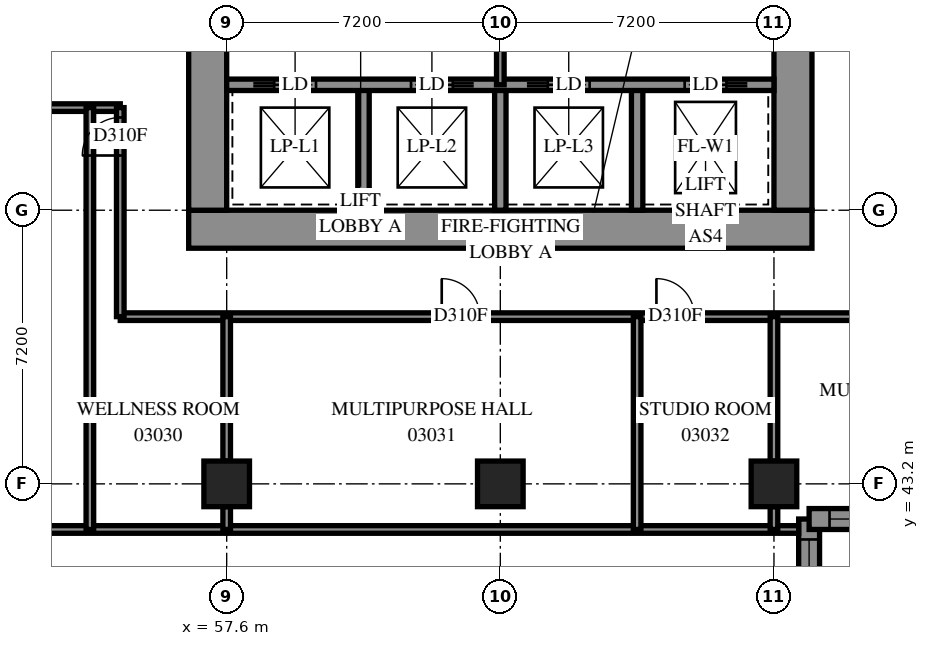
"""IFC4 building model, lengths in metres.
Left out: names, types, materials, properties, quantities, classifications, styles, units other than length and angle.
Written with IfcOpenShell. Run it as: python <this file> out.ifc"""

import sys

from ifc_helpers import new_model, si_unit, direction, frame, frame_2d, origin, origin_2d, place, context, subcontext, project, spatial, polyline, rectangle, outline, extrude, element, fill, save


model = new_model("IFC4")
c1 = context("Model", 3, precision=1e-05, world=origin(), true_north=direction((0.0, 1.0)))
c2 = subcontext(c1, "Body", "Model", "MODEL_VIEW")
j1 = project(units=[si_unit("LENGTHUNIT", "METRE"), si_unit("PLANEANGLEUNIT", "RADIAN")], contexts=[c1])
p1 = place(None, origin())
s1 = spatial("IfcSite", under=j1, at=p1, CompositionType="ELEMENT")
p2 = place(p1, origin())
s2 = spatial("IfcBuilding", under=s1, at=p2, CompositionType="ELEMENT")
p3 = place(p2, frame((0.0, 0.0, 14.4)))
s3 = spatial("IfcBuildingStorey", under=s2, at=p3, CompositionType="ELEMENT", Elevation=14.4)
for number, where, z_axis, x_axis in (
    (1, (57.6, 43.2, 0.0), (0.0, 0.0, 1.0), (1.0, 0.0, 0.0)),
    (2, (64.8, 43.2, 0.0), (0.0, 0.0, 1.0), (1.0, 0.0, 0.0)),
    (3, (72.0, 43.2, 0.0), (0.0, 0.0, 1.0), (1.0, 0.0, 0.0)),
):
    element("IfcColumn", number, at=place(p3, frame(where, z_axis=z_axis, x_axis=x_axis)), inside=s3, PredefinedType="COLUMN", context=c2, shape_type="SweptSolid", body=[
        extrude(rectangle(XDim=1.2, YDim=1.2, at=origin_2d()), origin(), (0.0, 0.0, 1.0), 3.8),
    ])
p4 = place(p3, frame((56.6, 49.9, -0.4), z_axis=(0.0, 0.0, 1.0), x_axis=(1.0, 0.0, 0.0)))
e4 = element("IfcWall", 4, at=p4, inside=s3, PredefinedType="SHEAR", context=c2, shape_type="SweptSolid", body=[
    extrude(rectangle(XDim=16.4, YDim=1.0, at=frame_2d((8.2, 0.0))), origin(), (0.0, 0.0, 1.0), 3.5),
])
p5 = place(p3, frame((57.1, 50.4, -0.4), z_axis=(0.0, 0.0, 1.0), x_axis=(0.0, 1.0, 0.0)))
e5 = element("IfcWall", 5, at=p5, inside=s3, PredefinedType="SHEAR", context=c2, shape_type="SweptSolid", body=[
    extrude(rectangle(XDim=14.4, YDim=1.0, at=frame_2d((7.2, 0.0))), origin(), (0.0, 0.0, 1.0), 3.5),
])
p6 = place(p5, frame((4.55, 0.0, 0.4)))
e6 = element("IfcOpeningElement", 6, at=p6, cuts=e5, PredefinedType="OPENING", context=c2, shape_type="SweptSolid", body=[
    extrude(rectangle(XDim=1.1, YDim=2.1, at=frame_2d((0.55, 1.05))), frame((0.0, 0.51, 0.0), z_axis=(0.0, -1.0, 0.0), x_axis=(1.0, 0.0, 0.0)), (0.0, 0.0, 1.0), 1.02),
])
p7 = place(p5, frame((11.35, 0.0, 0.4)))
e7 = element("IfcOpeningElement", 7, at=p7, cuts=e5, PredefinedType="OPENING", context=c2, shape_type="SweptSolid", body=[
    extrude(rectangle(XDim=1.1, YDim=2.1, at=frame_2d((0.55, 1.05))), frame((0.0, 0.51, 0.0), z_axis=(0.0, -1.0, 0.0), x_axis=(1.0, 0.0, 0.0)), (0.0, 0.0, 1.0), 1.02),
])
p8 = place(p3, frame((72.5, 50.4, -0.4), z_axis=(0.0, 0.0, 1.0), x_axis=(0.0, 1.0, 0.0)))
e8 = element("IfcWall", 8, at=p8, inside=s3, PredefinedType="SHEAR", context=c2, shape_type="SweptSolid", body=[
    extrude(rectangle(XDim=14.4, YDim=1.0, at=frame_2d((7.2, 0.0))), origin(), (0.0, 0.0, 1.0), 3.5),
])
p9 = place(p8, frame((4.55, 0.0, 0.4)))
e9 = element("IfcOpeningElement", 9, at=p9, cuts=e8, PredefinedType="OPENING", context=c2, shape_type="SweptSolid", body=[
    extrude(rectangle(XDim=1.1, YDim=2.1, at=frame_2d((0.55, 1.05))), frame((0.0, 0.51, 0.0), z_axis=(0.0, -1.0, 0.0), x_axis=(1.0, 0.0, 0.0)), (0.0, 0.0, 1.0), 1.02),
])
p10 = place(p8, frame((11.35, 0.0, 0.4)))
e10 = element("IfcOpeningElement", 10, at=p10, cuts=e8, PredefinedType="OPENING", context=c2, shape_type="SweptSolid", body=[
    extrude(rectangle(XDim=1.1, YDim=2.1, at=frame_2d((0.55, 1.05))), frame((0.0, 0.51, 0.0), z_axis=(0.0, -1.0, 0.0), x_axis=(1.0, 0.0, 0.0)), (0.0, 0.0, 1.0), 1.02),
])
for number, where, z_axis, x_axis in (
    (11, (61.2, 50.4, 0.0), (0.0, 0.0, 1.0), (0.0, 1.0, 0.0)),
    (12, (64.8, 50.4, 0.0), (0.0, 0.0, 1.0), (0.0, 1.0, 0.0)),
    (13, (68.4, 50.4, 0.0), (0.0, 0.0, 1.0), (0.0, 1.0, 0.0)),
):
    element("IfcWall", number, at=place(p3, frame(where, z_axis=z_axis, x_axis=x_axis)), inside=s3, PredefinedType="SOLIDWALL", context=c2, shape_type="SweptSolid", body=[
        extrude(rectangle(XDim=3.3, YDim=0.3, at=frame_2d((1.65, 0.0))), origin(), (0.0, 0.0, 1.0), 3.8),
    ])
p11 = place(p3, frame((57.6, 53.7, 0.0), z_axis=(0.0, 0.0, 1.0), x_axis=(1.0, 0.0, 0.0)))
e14 = element("IfcWall", 14, at=p11, inside=s3, PredefinedType="SOLIDWALL", context=c2, shape_type="SweptSolid", body=[
    extrude(rectangle(XDim=14.4, YDim=0.3, at=frame_2d((7.2, 0.0))), origin(), (0.0, 0.0, 1.0), 3.8),
])
p12 = place(p11, frame((1.25, 0.0, 0.0)))
e15 = element("IfcOpeningElement", 15, at=p12, cuts=e14, PredefinedType="OPENING", context=c2, shape_type="SweptSolid", body=[
    extrude(rectangle(XDim=1.1, YDim=2.1, at=frame_2d((0.55, 1.05))), frame((0.0, 0.16, 0.0), z_axis=(0.0, -1.0, 0.0), x_axis=(1.0, 0.0, 0.0)), (0.0, 0.0, 1.0), 0.32),
])
p13 = place(p11, frame((4.85, 0.0, 0.0)))
e16 = element("IfcOpeningElement", 16, at=p13, cuts=e14, PredefinedType="OPENING", context=c2, shape_type="SweptSolid", body=[
    extrude(rectangle(XDim=1.1, YDim=2.1, at=frame_2d((0.55, 1.05))), frame((0.0, 0.16, 0.0), z_axis=(0.0, -1.0, 0.0), x_axis=(1.0, 0.0, 0.0)), (0.0, 0.0, 1.0), 0.32),
])
p14 = place(p11, frame((8.45, 0.0, 0.0)))
e17 = element("IfcOpeningElement", 17, at=p14, cuts=e14, PredefinedType="OPENING", context=c2, shape_type="SweptSolid", body=[
    extrude(rectangle(XDim=1.1, YDim=2.1, at=frame_2d((0.55, 1.05))), frame((0.0, 0.16, 0.0), z_axis=(0.0, -1.0, 0.0), x_axis=(1.0, 0.0, 0.0)), (0.0, 0.0, 1.0), 0.32),
])
p15 = place(p11, frame((12.05, 0.0, 0.0)))
e18 = element("IfcOpeningElement", 18, at=p15, cuts=e14, PredefinedType="OPENING", context=c2, shape_type="SweptSolid", body=[
    extrude(rectangle(XDim=1.1, YDim=2.1, at=frame_2d((0.55, 1.05))), frame((0.0, 0.16, 0.0), z_axis=(0.0, -1.0, 0.0), x_axis=(1.0, 0.0, 0.0)), (0.0, 0.0, 1.0), 0.32),
])
p16 = place(p3, frame((72.925, 27.875, 0.0), z_axis=(0.0, 0.0, 1.0), x_axis=(0.0, 1.0, 0.0)))
e19 = element("IfcWall", 19, at=p16, inside=s3, PredefinedType="SOLIDWALL", context=c2, shape_type="SweptSolid", body=[
    extrude(outline(polyline([(-0.275, -0.275), (14.125, -0.275), (14.675, 0.275), (0.275, 0.275), (-0.275, -0.275)])), origin(), (0.0, 0.0, 1.0), 3.8),
])
p17 = place(p16, frame((1.825, 0.0, 0.7)))
e20 = element("IfcOpeningElement", 20, at=p17, cuts=e19, PredefinedType="OPENING", context=c2, shape_type="SweptSolid", body=[
    extrude(rectangle(XDim=1.8, YDim=2.6, at=frame_2d((0.9, 1.3))), frame((0.0, 0.285, 0.0), z_axis=(0.0, -1.0, 0.0), x_axis=(1.0, 0.0, 0.0)), (0.0, 0.0, 1.0), 0.57),
])
p18 = place(p16, frame((5.425, 0.0, 0.7)))
e21 = element("IfcOpeningElement", 21, at=p18, cuts=e19, PredefinedType="OPENING", context=c2, shape_type="SweptSolid", body=[
    extrude(rectangle(XDim=1.8, YDim=2.6, at=frame_2d((0.9, 1.3))), frame((0.0, 0.285, 0.0), z_axis=(0.0, -1.0, 0.0), x_axis=(1.0, 0.0, 0.0)), (0.0, 0.0, 1.0), 0.57),
])
p19 = place(p16, frame((9.025, 0.0, 0.7)))
e22 = element("IfcOpeningElement", 22, at=p19, cuts=e19, PredefinedType="OPENING", context=c2, shape_type="SweptSolid", body=[
    extrude(rectangle(XDim=1.8, YDim=2.6, at=frame_2d((0.9, 1.3))), frame((0.0, 0.285, 0.0), z_axis=(0.0, -1.0, 0.0), x_axis=(1.0, 0.0, 0.0)), (0.0, 0.0, 1.0), 0.57),
])
p20 = place(p16, frame((12.062, 0.0, 0.7)))
e23 = element("IfcOpeningElement", 23, at=p20, cuts=e19, PredefinedType="OPENING", context=c2, shape_type="SweptSolid", body=[
    extrude(rectangle(XDim=1.8, YDim=2.6, at=frame_2d((0.9, 1.3))), frame((0.0, 0.285, 0.0), z_axis=(0.0, -1.0, 0.0), x_axis=(1.0, 0.0, 0.0)), (0.0, 0.0, 1.0), 0.57),
])
p21 = place(p3, frame((72.925, 42.275, 0.0), z_axis=(0.0, 0.0, 1.0), x_axis=(1.0, 0.0, 0.0)))
e24 = element("IfcWall", 24, at=p21, inside=s3, PredefinedType="SOLIDWALL", context=c2, shape_type="SweptSolid", body=[
    extrude(outline(polyline([(0.275, -0.275), (4.031, -0.275), (4.259, 0.275), (-0.275, 0.275), (0.275, -0.275)])), origin(), (0.0, 0.0, 1.0), 3.8),
])
p22 = place(p21, frame((0.537, 0.0, 0.7)))
e25 = element("IfcOpeningElement", 25, at=p22, cuts=e24, PredefinedType="OPENING", context=c2, shape_type="SweptSolid", body=[
    extrude(rectangle(XDim=1.8, YDim=2.6, at=frame_2d((0.9, 1.3))), frame((0.0, 0.285, 0.0), z_axis=(0.0, -1.0, 0.0), x_axis=(1.0, 0.0, 0.0)), (0.0, 0.0, 1.0), 0.57),
])
p23 = place(p3, frame((64.8, 53.7, 0.0), z_axis=(0.0, 0.0, 1.0), x_axis=(0.0, 1.0, 0.0)))
e26 = element("IfcWall", 26, at=p23, inside=s3, PredefinedType="PARTITIONING", context=c2, shape_type="SweptSolid", body=[
    extrude(rectangle(XDim=3.6, YDim=0.2, at=frame_2d((1.8, 0.0))), origin(), (0.0, 0.0, 1.0), 3.8),
])
p24 = place(p3, frame((13.75, 42.0, 0.0), z_axis=(0.0, 0.0, 1.0), x_axis=(1.0, 0.0, 0.0)))
e27 = element("IfcWall", 27, at=p24, inside=s3, PredefinedType="PARTITIONING", context=c2, shape_type="SweptSolid", body=[
    extrude(rectangle(XDim=58.9, YDim=0.2, at=frame_2d((29.45, 0.0))), origin(), (0.0, 0.0, 1.0), 3.8),
])
p25 = place(p3, frame((0.0, 53.1, 0.0), z_axis=(0.0, 0.0, 1.0), x_axis=(1.0, 0.0, 0.0)))
e28 = element("IfcWall", 28, at=p25, inside=s3, PredefinedType="PARTITIONING", context=c2, shape_type="SweptSolid", body=[
    extrude(rectangle(XDim=54.8, YDim=0.2, at=frame_2d((27.4, 0.0))), origin(), (0.0, 0.0, 1.0), 3.8),
])
p26 = place(p25, frame((8.669, 0.0, 0.0)))
e29 = element("IfcOpeningElement", 29, at=p26, cuts=e28, PredefinedType="OPENING", context=c2, shape_type="SweptSolid", body=[
    extrude(rectangle(XDim=1.0, YDim=2.1, at=frame_2d((0.5, 1.05))), frame((0.0, 0.11, 0.0), z_axis=(0.0, -1.0, 0.0), x_axis=(1.0, 0.0, 0.0)), (0.0, 0.0, 1.0), 0.22),
])
p27 = place(p25, frame((11.307, 0.0, 0.0)))
e30 = element("IfcOpeningElement", 30, at=p27, cuts=e28, PredefinedType="OPENING", context=c2, shape_type="SweptSolid", body=[
    extrude(rectangle(XDim=1.0, YDim=2.1, at=frame_2d((0.5, 1.05))), frame((0.0, 0.11, 0.0), z_axis=(0.0, -1.0, 0.0), x_axis=(1.0, 0.0, 0.0)), (0.0, 0.0, 1.0), 0.22),
])
p28 = place(p25, frame((20.058, 0.0, 0.0)))
e31 = element("IfcOpeningElement", 31, at=p28, cuts=e28, PredefinedType="OPENING", context=c2, shape_type="SweptSolid", body=[
    extrude(rectangle(XDim=1.0, YDim=2.1, at=frame_2d((0.5, 1.05))), frame((0.0, 0.11, 0.0), z_axis=(0.0, -1.0, 0.0), x_axis=(1.0, 0.0, 0.0)), (0.0, 0.0, 1.0), 0.22),
])
p29 = place(p25, frame((27.538, 0.0, 0.0)))
e32 = element("IfcOpeningElement", 32, at=p29, cuts=e28, PredefinedType="OPENING", context=c2, shape_type="SweptSolid", body=[
    extrude(rectangle(XDim=1.0, YDim=2.1, at=frame_2d((0.5, 1.05))), frame((0.0, 0.11, 0.0), z_axis=(0.0, -1.0, 0.0), x_axis=(1.0, 0.0, 0.0)), (0.0, 0.0, 1.0), 0.22),
])
p30 = place(p25, frame((36.542, 0.0, 0.0)))
e33 = element("IfcOpeningElement", 33, at=p30, cuts=e28, PredefinedType="OPENING", context=c2, shape_type="SweptSolid", body=[
    extrude(rectangle(XDim=1.0, YDim=2.1, at=frame_2d((0.5, 1.05))), frame((0.0, 0.11, 0.0), z_axis=(0.0, -1.0, 0.0), x_axis=(1.0, 0.0, 0.0)), (0.0, 0.0, 1.0), 0.22),
])
p31 = place(p25, frame((48.858, 0.0, 0.0)))
e34 = element("IfcOpeningElement", 34, at=p31, cuts=e28, PredefinedType="OPENING", context=c2, shape_type="SweptSolid", body=[
    extrude(rectangle(XDim=1.0, YDim=2.1, at=frame_2d((0.5, 1.05))), frame((0.0, 0.11, 0.0), z_axis=(0.0, -1.0, 0.0), x_axis=(1.0, 0.0, 0.0)), (0.0, 0.0, 1.0), 0.22),
])
p32 = place(p25, frame((2.522, 0.0, 0.0)))
e35 = element("IfcOpeningElement", 35, at=p32, cuts=e28, PredefinedType="OPENING", context=c2, shape_type="SweptSolid", body=[
    extrude(rectangle(XDim=1.0, YDim=2.1, at=frame_2d((0.5, 1.05))), frame((0.0, 0.11, 0.0), z_axis=(0.0, -1.0, 0.0), x_axis=(1.0, 0.0, 0.0)), (0.0, 0.0, 1.0), 0.22),
])
p33 = place(p25, frame((4.79, 0.0, 0.0)))
e36 = element("IfcOpeningElement", 36, at=p33, cuts=e28, PredefinedType="OPENING", context=c2, shape_type="SweptSolid", body=[
    extrude(rectangle(XDim=1.0, YDim=2.1, at=frame_2d((0.5, 1.05))), frame((0.0, 0.11, 0.0), z_axis=(0.0, -1.0, 0.0), x_axis=(1.0, 0.0, 0.0)), (0.0, 0.0, 1.0), 0.22),
])
p34 = place(p3, frame((54.8, 47.6, 0.0), z_axis=(0.0, 0.0, 1.0), x_axis=(1.0, 0.0, 0.0)))
e37 = element("IfcWall", 37, at=p34, inside=s3, PredefinedType="PARTITIONING", context=c2, shape_type="SweptSolid", body=[
    extrude(rectangle(XDim=19.384, YDim=0.2, at=frame_2d((9.692, 0.0))), origin(), (0.0, 0.0, 1.0), 3.8),
])
p35 = place(p34, frame((8.458, 0.0, 0.0)))
e38 = element("IfcOpeningElement", 38, at=p35, cuts=e37, PredefinedType="OPENING", context=c2, shape_type="SweptSolid", body=[
    extrude(rectangle(XDim=1.0, YDim=2.1, at=frame_2d((0.5, 1.05))), frame((0.0, 0.11, 0.0), z_axis=(0.0, -1.0, 0.0), x_axis=(1.0, 0.0, 0.0)), (0.0, 0.0, 1.0), 0.22),
])
p36 = place(p34, frame((14.107, 0.0, 0.0)))
e39 = element("IfcOpeningElement", 39, at=p36, cuts=e37, PredefinedType="OPENING", context=c2, shape_type="SweptSolid", body=[
    extrude(rectangle(XDim=1.0, YDim=2.1, at=frame_2d((0.5, 1.05))), frame((0.0, 0.11, 0.0), z_axis=(0.0, -1.0, 0.0), x_axis=(1.0, 0.0, 0.0)), (0.0, 0.0, 1.0), 0.22),
])
p37 = place(p3, frame((54.0, 42.0, 0.0), z_axis=(0.0, 0.0, 1.0), x_axis=(0.0, 1.0, 0.0)))
e40 = element("IfcWall", 40, at=p37, inside=s3, PredefinedType="PARTITIONING", context=c2, shape_type="SweptSolid", body=[
    extrude(rectangle(XDim=11.1, YDim=0.2, at=frame_2d((5.55, 0.0))), origin(), (0.0, 0.0, 1.0), 3.8),
])
p38 = place(p3, frame((68.4, 42.0, 0.0), z_axis=(0.0, 0.0, 1.0), x_axis=(0.0, 1.0, 0.0)))
e41 = element("IfcWall", 41, at=p38, inside=s3, PredefinedType="PARTITIONING", context=c2, shape_type="SweptSolid", body=[
    extrude(rectangle(XDim=5.6, YDim=0.2, at=frame_2d((2.8, 0.0))), origin(), (0.0, 0.0, 1.0), 3.8),
])
p39 = place(p3, frame((54.8, 47.6, 0.0), z_axis=(0.0, 0.0, 1.0), x_axis=(0.0, 1.0, 0.0)))
e42 = element("IfcWall", 42, at=p39, inside=s3, PredefinedType="PARTITIONING", context=c2, shape_type="SweptSolid", body=[
    extrude(rectangle(XDim=5.5, YDim=0.2, at=frame_2d((2.75, 0.0))), origin(), (0.0, 0.0, 1.0), 3.8),
])
p40 = place(p39, frame((4.24, 0.0, 0.0)))
e43 = element("IfcOpeningElement", 43, at=p40, cuts=e42, PredefinedType="OPENING", context=c2, shape_type="SweptSolid", body=[
    extrude(rectangle(XDim=1.0, YDim=2.1, at=frame_2d((0.5, 1.05))), frame((0.0, 0.11, 0.0), z_axis=(0.0, -1.0, 0.0), x_axis=(1.0, 0.0, 0.0)), (0.0, 0.0, 1.0), 0.22),
])
for number, where, z_axis, x_axis in (
    (44, (57.6, 43.8, 0.0), (0.0, 0.0, 1.0), (0.0, 1.0, 0.0)),
    (45, (72.0, 43.8, 0.0), (0.0, 0.0, 1.0), (0.0, 1.0, 0.0)),
):
    element("IfcWall", number, at=place(p3, frame(where, z_axis=z_axis, x_axis=x_axis)), inside=s3, PredefinedType="PARTITIONING", context=c2, shape_type="SweptSolid", body=[
        extrude(rectangle(XDim=3.8, YDim=0.2, at=frame_2d((1.9, 0.0))), origin(), (0.0, 0.0, 1.0), 3.8),
    ])
p41 = place(p3, frame((57.6, 42.0, 0.0), z_axis=(0.0, 0.0, 1.0), x_axis=(0.0, 1.0, 0.0)))
e46 = element("IfcWall", 46, at=p41, inside=s3, PredefinedType="PARTITIONING", context=c2, shape_type="SweptSolid", body=[
    extrude(rectangle(XDim=0.6, YDim=0.2, at=frame_2d((0.3, 0.0))), origin(), (0.0, 0.0, 1.0), 3.8),
])
p42 = place(p3, frame((72.0, 42.0, 0.0), z_axis=(0.0, 0.0, 1.0), x_axis=(0.0, 1.0, 0.0)))
e47 = element("IfcWall", 47, at=p42, inside=s3, PredefinedType="PARTITIONING", context=c2, shape_type="SweptSolid", body=[
    extrude(rectangle(XDim=0.6, YDim=0.2, at=frame_2d((0.3, 0.0))), origin(), (0.0, 0.0, 1.0), 3.2),
])
p43 = place(p20, origin())
e48 = element("IfcWindow", 48, at=p43, inside=s3, PartitioningType="SINGLE_PANEL", PredefinedType="WINDOW", context=c2, shape_type="SweptSolid", body=[
    extrude(rectangle(XDim=1.8, YDim=2.6, at=frame_2d((0.9, 1.3))), frame((0.0, 0.155, 0.0), z_axis=(0.0, -1.0, 0.0), x_axis=(1.0, 0.0, 0.0)), (0.0, 0.0, 1.0), 0.06),
])
fill(e23, e48)
p44 = place(p22, origin())
e49 = element("IfcWindow", 49, at=p44, inside=s3, PartitioningType="SINGLE_PANEL", PredefinedType="WINDOW", context=c2, shape_type="SweptSolid", body=[
    extrude(rectangle(XDim=1.8, YDim=2.6, at=frame_2d((0.9, 1.3))), frame((0.0, 0.155, 0.0), z_axis=(0.0, -1.0, 0.0), x_axis=(1.0, 0.0, 0.0)), (0.0, 0.0, 1.0), 0.06),
])
fill(e25, e49)
p45 = place(p12, origin())
e50 = element("IfcDoor", 50, at=p45, inside=s3, OperationType="SLIDING_TO_LEFT", PredefinedType="DOOR", context=c2, shape_type="SweptSolid", body=[
    extrude(rectangle(XDim=1.1, YDim=2.1, at=frame_2d((0.55, 1.05))), frame((0.0, 0.025, 0.0), z_axis=(0.0, -1.0, 0.0), x_axis=(1.0, 0.0, 0.0)), (0.0, 0.0, 1.0), 0.05),
])
fill(e15, e50)
p46 = place(p13, origin())
e51 = element("IfcDoor", 51, at=p46, inside=s3, OperationType="SLIDING_TO_RIGHT", PredefinedType="DOOR", context=c2, shape_type="SweptSolid", body=[
    extrude(rectangle(XDim=1.1, YDim=2.1, at=frame_2d((0.55, 1.05))), frame((0.0, 0.025, 0.0), z_axis=(0.0, -1.0, 0.0), x_axis=(1.0, 0.0, 0.0)), (0.0, 0.0, 1.0), 0.05),
])
fill(e16, e51)
p47 = place(p14, origin())
e52 = element("IfcDoor", 52, at=p47, inside=s3, OperationType="SLIDING_TO_LEFT", PredefinedType="DOOR", context=c2, shape_type="SweptSolid", body=[
    extrude(rectangle(XDim=1.1, YDim=2.1, at=frame_2d((0.55, 1.05))), frame((0.0, 0.025, 0.0), z_axis=(0.0, -1.0, 0.0), x_axis=(1.0, 0.0, 0.0)), (0.0, 0.0, 1.0), 0.05),
])
fill(e17, e52)
p48 = place(p15, origin())
e53 = element("IfcDoor", 53, at=p48, inside=s3, OperationType="SLIDING_TO_RIGHT", PredefinedType="DOOR", context=c2, shape_type="SweptSolid", body=[
    extrude(rectangle(XDim=1.1, YDim=2.1, at=frame_2d((0.55, 1.05))), frame((0.0, 0.025, 0.0), z_axis=(0.0, -1.0, 0.0), x_axis=(1.0, 0.0, 0.0)), (0.0, 0.0, 1.0), 0.05),
])
fill(e18, e53)
p49 = place(p40, origin())
e54 = element("IfcDoor", 54, at=p49, inside=s3, OperationType="SINGLE_SWING_RIGHT", PredefinedType="DOOR", context=c2, shape_type="SweptSolid", body=[
    extrude(rectangle(XDim=1.0, YDim=2.1, at=frame_2d((0.5, 1.05))), frame((0.0, 0.025, 0.0), z_axis=(0.0, -1.0, 0.0), x_axis=(1.0, 0.0, 0.0)), (0.0, 0.0, 1.0), 0.05),
])
fill(e43, e54)
p50 = place(p35, origin())
e55 = element("IfcDoor", 55, at=p50, inside=s3, OperationType="SINGLE_SWING_LEFT", PredefinedType="DOOR", context=c2, shape_type="SweptSolid", body=[
    extrude(rectangle(XDim=1.0, YDim=2.1, at=frame_2d((0.5, 1.05))), frame((0.0, 0.025, 0.0), z_axis=(0.0, -1.0, 0.0), x_axis=(1.0, 0.0, 0.0)), (0.0, 0.0, 1.0), 0.05),
])
fill(e38, e55)
p51 = place(p36, origin())
e56 = element("IfcDoor", 56, at=p51, inside=s3, OperationType="SINGLE_SWING_RIGHT", PredefinedType="DOOR", context=c2, shape_type="SweptSolid", body=[
    extrude(rectangle(XDim=1.0, YDim=2.1, at=frame_2d((0.5, 1.05))), frame((0.0, 0.025, 0.0), z_axis=(0.0, -1.0, 0.0), x_axis=(1.0, 0.0, 0.0)), (0.0, 0.0, 1.0), 0.05),
])
fill(e39, e56)
save(model, sys.argv[1])
